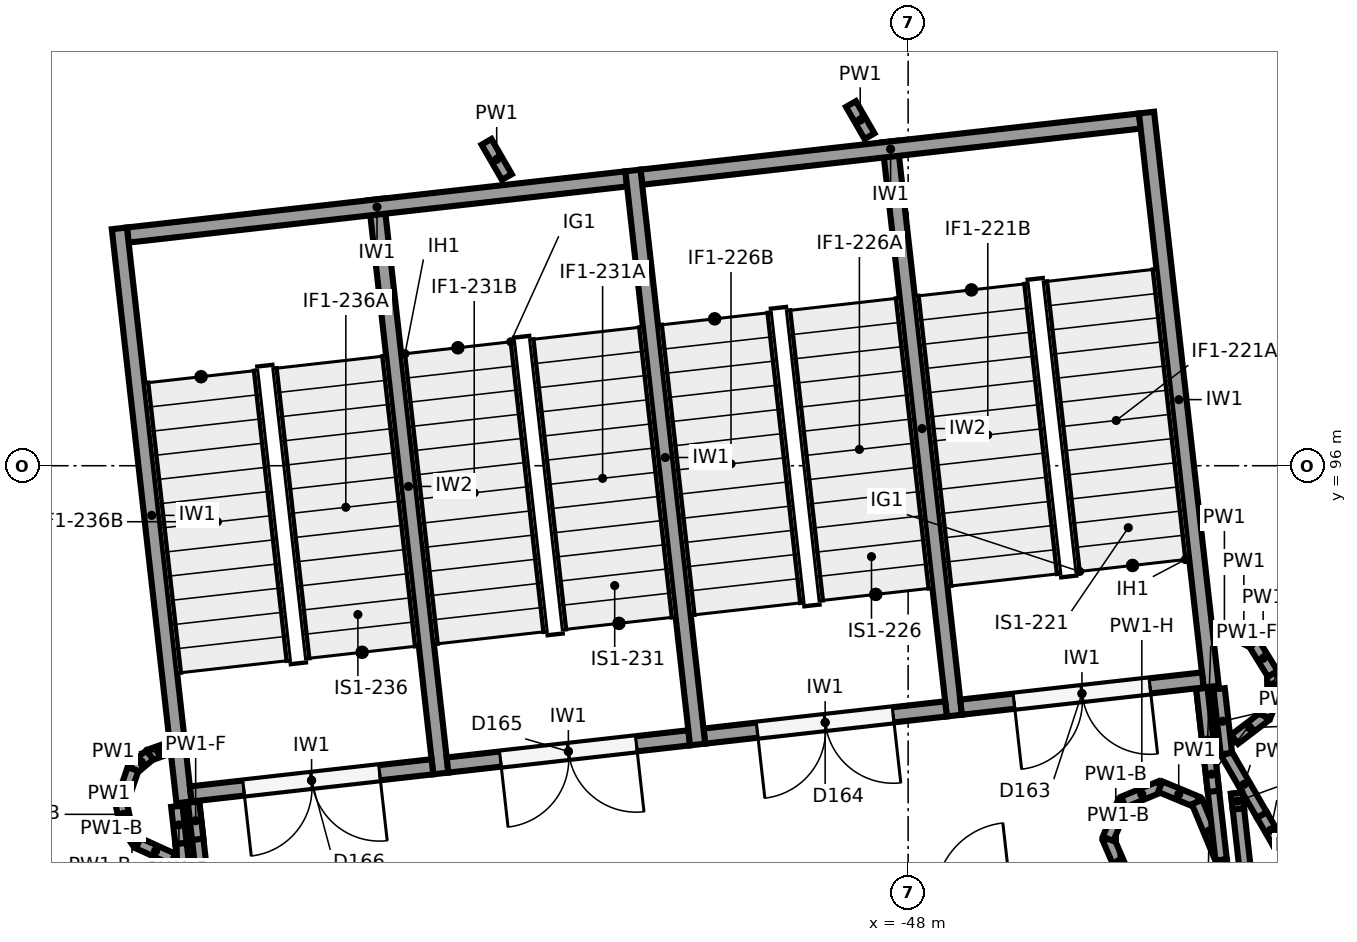
"""IFC4 building model, lengths in metres.
Left out: names, types, materials, properties, quantities, classifications, styles, units other than length and angle.
Written with IfcOpenShell. Run it as: python <this file> out.ifc"""

import sys

from ifc_helpers import new_model, si_unit, direction, frame, frame_2d, origin, origin_2d, place, context, subcontext, project, spatial, rectangle, circle, extrude, element, fill, save


model = new_model("IFC4")
c1 = context("Model", 3, precision=1e-05, world=origin(), true_north=direction((0.0, 1.0)))
c2 = subcontext(c1, "Body", "Model", "MODEL_VIEW")
j1 = project(units=[si_unit("LENGTHUNIT", "METRE"), si_unit("PLANEANGLEUNIT", "RADIAN")], contexts=[c1])
p1 = place(None, origin())
s1 = spatial("IfcSite", under=j1, at=p1, CompositionType="ELEMENT")
p2 = place(p1, origin())
s2 = spatial("IfcBuilding", under=s1, at=p2, CompositionType="ELEMENT")
p3 = place(p2, frame((0.0, 0.0, -4.0)))
s3 = spatial("IfcBuildingStorey", under=s2, at=p3, CompositionType="ELEMENT", Elevation=-4.0)
p4 = place(p3, frame((-44.683, 91.091, -1.2), z_axis=(0.0, 0.0, 1.0), x_axis=(1.0, 0.0, 0.0)))
e1 = element("IfcColumn", 1, at=p4, inside=s3, PredefinedType="COLUMN", context=c2, shape_type="SweptSolid", body=[
    extrude(circle(Radius=0.55, at=origin_2d()), origin(), (0.0, 0.0, 1.0), 5.2),
])
p5 = place(p3, frame((-44.863, 100.646, -1.2), z_axis=(0.0, 0.0, 1.0), x_axis=(0.111951003472, -0.993713727802, 0.0)))
e2 = element("IfcWall", 2, at=p5, inside=s3, PredefinedType="SHEAR", context=c2, shape_type="SweptSolid", body=[
    extrude(rectangle(XDim=7.6, YDim=0.2, at=frame_2d((3.8, 0.0))), origin(), (0.0, 0.0, 1.0), 4.8),
])
p6 = place(p3, frame((-51.621, 99.885, -1.2), z_axis=(0.0, 0.0, 1.0), x_axis=(0.111947429915, -0.993714130389, 0.0)))
e3 = element("IfcWall", 3, at=p6, inside=s3, PredefinedType="SHEAR", context=c2, shape_type="SweptSolid", body=[
    extrude(rectangle(XDim=7.6, YDim=0.2, at=frame_2d((3.8, 0.0))), origin(), (0.0, 0.0, 1.0), 4.8),
])
p7 = place(p3, frame((-58.378, 99.123, -1.2), z_axis=(0.0, 0.0, 1.0), x_axis=(0.111982724367, -0.993710153638, 0.0)))
e4 = element("IfcWall", 4, at=p7, inside=s3, PredefinedType="SHEAR", context=c2, shape_type="SweptSolid", body=[
    extrude(rectangle(XDim=7.6, YDim=0.2, at=frame_2d((3.8, 0.0))), origin(), (0.0, 0.0, 1.0), 4.8),
])
for number, where, z_axis, x_axis in (
    (5, (-44.951, 100.535, -1.2), (0.0, 0.0, 1.0), (-0.994, -0.112, 0.0)),
    (6, (-51.709, 99.774, -1.2), (0.0, 0.0, 1.0), (-0.994, -0.112, 0.0)),
):
    element("IfcWall", number, at=place(p3, frame(where, z_axis=z_axis, x_axis=x_axis)), inside=s3, PredefinedType="SHEAR", context=c2, shape_type="SweptSolid", body=[
        extrude(rectangle(XDim=6.6, YDim=0.2, at=frame_2d((3.3, 0.0))), origin(), (0.0, 0.0, 1.0), 4.8),
    ])
p8 = place(p3, frame((-48.242, 100.265, -1.2), z_axis=(0.0, 0.0, 1.0), x_axis=(0.111954577255, -0.993713325176, 0.0)))
e7 = element("IfcWall", 7, at=p8, inside=s3, PredefinedType="SHEAR", context=c2, shape_type="SweptSolid", body=[
    extrude(rectangle(XDim=7.6, YDim=0.2, at=frame_2d((3.8, 0.0))), origin(), (0.0, 0.0, 1.0), 4.8),
])
p9 = place(p3, frame((-54.999, 99.504, -1.2), z_axis=(0.0, 0.0, 1.0), x_axis=(0.111982724367, -0.993710153638, 0.0)))
e8 = element("IfcWall", 8, at=p9, inside=s3, PredefinedType="SHEAR", context=c2, shape_type="SweptSolid", body=[
    extrude(rectangle(XDim=7.6, YDim=0.2, at=frame_2d((3.8, 0.0))), origin(), (0.0, 0.0, 1.0), 4.8),
])
p10 = place(p3, frame((-44.123, 93.182, -1.2), z_axis=(0.0, 0.0, 1.0), x_axis=(-0.993717005286, -0.11192190762, 0.0)))
e9 = element("IfcWall", 9, at=p10, inside=s3, PredefinedType="SHEAR", context=c2, shape_type="SweptSolid", body=[
    extrude(rectangle(XDim=3.2, YDim=0.2, at=frame_2d((1.6, 0.0))), origin(), (0.0, 0.0, 1.0), 4.8),
])
p11 = place(p10, frame((0.7, 0.0, 1.2)))
e10 = element("IfcOpeningElement", 10, at=p11, cuts=e9, PredefinedType="OPENING", context=c2, shape_type="SweptSolid", body=[
    extrude(rectangle(XDim=1.8, YDim=2.1, at=frame_2d((0.9, 1.05))), frame((0.0, 0.11, 0.0), z_axis=(0.0, -1.0, 0.0), x_axis=(1.0, 0.0, 0.0)), (0.0, 0.0, 1.0), 0.22),
])
p12 = place(p3, frame((-47.502, 92.801, -1.2), z_axis=(0.0, 0.0, 1.0), x_axis=(-0.993707560215, -0.112005735442, 0.0)))
e11 = element("IfcWall", 11, at=p12, inside=s3, PredefinedType="SHEAR", context=c2, shape_type="SweptSolid", body=[
    extrude(rectangle(XDim=3.2, YDim=0.2, at=frame_2d((1.6, 0.0))), origin(), (0.0, 0.0, 1.0), 4.8),
])
p13 = place(p12, frame((0.7, 0.0, 1.2)))
e12 = element("IfcOpeningElement", 12, at=p13, cuts=e11, PredefinedType="OPENING", context=c2, shape_type="SweptSolid", body=[
    extrude(rectangle(XDim=1.8, YDim=2.1, at=frame_2d((0.9, 1.05))), frame((0.0, 0.11, 0.0), z_axis=(0.0, -1.0, 0.0), x_axis=(1.0, 0.0, 0.0)), (0.0, 0.0, 1.0), 0.22),
])
p14 = place(p3, frame((-50.88, 92.42, -1.2), z_axis=(0.0, 0.0, 1.0), x_axis=(-0.993707560215, -0.112005735442, 0.0)))
e13 = element("IfcWall", 13, at=p14, inside=s3, PredefinedType="SHEAR", context=c2, shape_type="SweptSolid", body=[
    extrude(rectangle(XDim=3.2, YDim=0.2, at=frame_2d((1.6, 0.0))), origin(), (0.0, 0.0, 1.0), 4.8),
])
p15 = place(p14, frame((0.7, 0.0, 1.2)))
e14 = element("IfcOpeningElement", 14, at=p15, cuts=e13, PredefinedType="OPENING", context=c2, shape_type="SweptSolid", body=[
    extrude(rectangle(XDim=1.8, YDim=2.1, at=frame_2d((0.9, 1.05))), frame((0.0, 0.11, 0.0), z_axis=(0.0, -1.0, 0.0), x_axis=(1.0, 0.0, 0.0)), (0.0, 0.0, 1.0), 0.22),
])
p16 = place(p3, frame((-54.259, 92.04, -1.2), z_axis=(0.0, 0.0, 1.0), x_axis=(-0.993717005286, -0.11192190762, 0.0)))
e15 = element("IfcWall", 15, at=p16, inside=s3, PredefinedType="SHEAR", context=c2, shape_type="SweptSolid", body=[
    extrude(rectangle(XDim=3.2, YDim=0.2, at=frame_2d((1.6, 0.0))), origin(), (0.0, 0.0, 1.0), 4.8),
])
p17 = place(p16, frame((0.7, 0.0, 1.2)))
e16 = element("IfcOpeningElement", 16, at=p17, cuts=e15, PredefinedType="OPENING", context=c2, shape_type="SweptSolid", body=[
    extrude(rectangle(XDim=1.8, YDim=2.1, at=frame_2d((0.9, 1.05))), frame((0.0, 0.11, 0.0), z_axis=(0.0, -1.0, 0.0), x_axis=(1.0, 0.0, 0.0)), (0.0, 0.0, 1.0), 0.22),
])
p18 = place(p3, frame((-48.508, 100.336, 0.0), z_axis=(0.0, 0.0, 1.0), x_axis=(-0.50016937228, 0.865927594567, 0.0)))
e17 = element("IfcWall", 17, at=p18, inside=s3, PredefinedType="PARTITIONING", context=c2, shape_type="SweptSolid", body=[
    extrude(rectangle(XDim=0.489, YDim=0.15, at=frame_2d((0.244, 0.0))), origin(), (0.0, 0.0, 1.0), 3.6),
])
for number, where, z_axis, x_axis in (
    (18, (-42.881, 90.6, 0.0), (0.0, 0.0, 1.0), (-0.5, 0.866, 0.0)),
    (19, (-43.114, 91.003, 0.0), (0.0, 0.0, 1.0), (-0.5, 0.866, 0.0)),
):
    element("IfcWall", number, at=place(p3, frame(where, z_axis=z_axis, x_axis=x_axis)), inside=s3, PredefinedType="PARTITIONING", context=c2, shape_type="SweptSolid", body=[
        extrude(rectangle(XDim=0.466, YDim=0.15, at=frame_2d((0.233, 0.0))), origin(), (0.0, 0.0, 1.0), 2.5),
    ])
p19 = place(p3, frame((-43.346, 91.406, 0.0), z_axis=(0.0, 0.0, 1.0), x_axis=(-0.500395505551, 0.865796938101, 0.0)))
e20 = element("IfcWall", 20, at=p19, inside=s3, PredefinedType="PARTITIONING", context=c2, shape_type="SweptSolid", body=[
    extrude(rectangle(XDim=0.931, YDim=0.15, at=frame_2d((0.466, 0.0))), origin(), (0.0, 0.0, 1.0), 3.6),
])
p20 = place(p3, frame((-43.812, 92.212, 0.0), z_axis=(0.0, 0.0, 1.0), x_axis=(-0.112117924941, 0.993694908363, 0.0)))
e21 = element("IfcWall", 21, at=p20, inside=s3, PredefinedType="PARTITIONING", context=c2, shape_type="SweptSolid", body=[
    extrude(rectangle(XDim=0.858, YDim=0.15, at=frame_2d((0.429, 0.0))), origin(), (0.0, 0.0, 1.0), 3.6),
])
p21 = place(p3, frame((-57.622, 91.52, 0.0), z_axis=(0.0, 0.0, 1.0), x_axis=(0.112221929923, -0.993683168039, 0.0)))
e22 = element("IfcWall", 22, at=p21, inside=s3, PredefinedType="PARTITIONING", context=c2, shape_type="SweptSolid", body=[
    extrude(rectangle(XDim=0.494, YDim=0.15, at=frame_2d((0.247, 0.0))), origin(), (0.0, 0.0, 1.0), 2.5),
])
p22 = place(p3, frame((-57.566, 91.029, 0.0), z_axis=(0.0, 0.0, 1.0), x_axis=(0.111733745595, -0.993738179852, 0.0)))
e23 = element("IfcWall", 23, at=p22, inside=s3, PredefinedType="PARTITIONING", context=c2, shape_type="SweptSolid", body=[
    extrude(rectangle(XDim=0.988, YDim=0.15, at=frame_2d((0.494, 0.0))), origin(), (0.0, 0.0, 1.0), 2.5),
])
p23 = place(p3, frame((-53.547, 100.261, 0.0), z_axis=(0.0, 0.0, 1.0), x_axis=(0.500460168826, -0.86575956213, 0.0)))
e24 = element("IfcWall", 24, at=p23, inside=s3, PredefinedType="PARTITIONING", context=c2, shape_type="SweptSolid", body=[
    extrude(rectangle(XDim=0.535, YDim=0.15, at=frame_2d((0.267, 0.0))), origin(), (0.0, 0.0, 1.0), 3.6),
])
p24 = place(p3, frame((-57.402, 91.575, 0.0), z_axis=(0.0, 0.0, 1.0), x_axis=(0.112018501257, -0.993706121233, 0.0)))
e25 = element("IfcWall", 25, at=p24, inside=s3, PredefinedType="PARTITIONING", context=c2, shape_type="SweptSolid", body=[
    extrude(rectangle(XDim=2.465, YDim=0.15, at=frame_2d((1.232, 0.0))), origin(), (0.0, 0.0, 1.0), 2.5),
])
p25 = place(p3, frame((-57.402, 91.575, 2.5), z_axis=(0.0, 0.0, 1.0), x_axis=(0.111953754949, -0.993713417819, 0.0)))
e26 = element("IfcWall", 26, at=p25, inside=s3, PredefinedType="PARTITIONING", context=c2, shape_type="SweptSolid", body=[
    extrude(rectangle(XDim=0.493, YDim=0.15, at=frame_2d((0.247, 0.0))), origin(), (0.0, 0.0, 1.0), 1.1),
])
p26 = place(p3, frame((-45.104, 90.48, 0.0), z_axis=(0.0, 0.0, 1.0), x_axis=(-0.396702631354, 0.917947178369, 0.0)))
e27 = element("IfcWall", 27, at=p26, inside=s3, PredefinedType="PARTITIONING", context=c2, shape_type="SweptSolid", body=[
    extrude(rectangle(XDim=0.667, YDim=0.15, at=frame_2d((0.333, 0.0))), origin(), (0.0, 0.0, 1.0), 2.5),
])
p27 = place(p3, frame((-45.369, 91.092, 0.0), z_axis=(0.0, 0.0, 1.0), x_axis=(0.382831074092, 0.923818363484, 0.0)))
e28 = element("IfcWall", 28, at=p27, inside=s3, PredefinedType="PARTITIONING", context=c2, shape_type="SweptSolid", body=[
    extrude(rectangle(XDim=0.525, YDim=0.15, at=frame_2d((0.262, 0.0))), origin(), (0.0, 0.0, 1.0), 2.5),
])
p28 = place(p3, frame((-45.168, 91.576, 0.0), z_axis=(0.0, 0.0, 1.0), x_axis=(0.923954536818, 0.382502305735, 0.0)))
e29 = element("IfcWall", 29, at=p28, inside=s3, PredefinedType="PARTITIONING", context=c2, shape_type="SweptSolid", body=[
    extrude(rectangle(XDim=0.525, YDim=0.15, at=frame_2d((0.263, 0.0))), origin(), (0.0, 0.0, 1.0), 3.0),
])
p29 = place(p3, frame((-44.682, 91.777, 0.0), z_axis=(0.0, 0.0, 1.0), x_axis=(0.923886494024, -0.382666625355, 0.0)))
e30 = element("IfcWall", 30, at=p29, inside=s3, PredefinedType="PARTITIONING", context=c2, shape_type="SweptSolid", body=[
    extrude(rectangle(XDim=0.525, YDim=0.15, at=frame_2d((0.263, 0.0))), origin(), (0.0, 0.0, 1.0), 3.6),
])
p30 = place(p3, frame((-44.197, 91.576, 0.0), z_axis=(0.0, 0.0, 1.0), x_axis=(0.382848633097, -0.923811086822, 0.0)))
e31 = element("IfcWall", 31, at=p30, inside=s3, PredefinedType="PARTITIONING", context=c2, shape_type="SweptSolid", body=[
    extrude(rectangle(XDim=0.824, YDim=0.15, at=frame_2d((0.412, 0.0))), origin(), (0.0, 0.0, 1.0), 2.5),
])
p31 = place(p3, frame((-43.882, 90.815, 0.0), z_axis=(0.0, 0.0, 1.0), x_axis=(-0.111895707458, 0.993719955849, 0.0)))
e32 = element("IfcWall", 32, at=p31, inside=s3, PredefinedType="PARTITIONING", context=c2, shape_type="SweptSolid", body=[
    extrude(rectangle(XDim=2.269, YDim=0.15, at=frame_2d((1.135, 0.0))), origin(), (0.0, 0.0, 1.0), 2.5),
])
p32 = place(p3, frame((-43.983, 91.717, 2.5), z_axis=(0.0, 0.0, 1.0), x_axis=(-0.111907672209, 0.993718608511, 0.0)))
e33 = element("IfcWall", 33, at=p32, inside=s3, PredefinedType="PARTITIONING", context=c2, shape_type="SweptSolid", body=[
    extrude(rectangle(XDim=1.361, YDim=0.15, at=frame_2d((0.681, 0.0))), origin(), (0.0, 0.0, 1.0), 1.1),
])
p33 = place(p3, frame((-57.736, 92.281, 0.0), z_axis=(0.0, 0.0, 1.0), x_axis=(-0.941549075512, -0.336875850133, 0.0)))
e34 = element("IfcWall", 34, at=p33, inside=s3, PredefinedType="PARTITIONING", context=c2, shape_type="SweptSolid", body=[
    extrude(rectangle(XDim=0.258, YDim=0.15, at=frame_2d((0.129, 0.0))), origin(), (0.0, 0.0, 1.0), 3.6),
])
p34 = place(p3, frame((-57.979, 92.195, 0.0), z_axis=(0.0, 0.0, 1.0), x_axis=(-0.763611518969, -0.64567596215, 0.0)))
e35 = element("IfcWall", 35, at=p34, inside=s3, PredefinedType="PARTITIONING", context=c2, shape_type="SweptSolid", body=[
    extrude(rectangle(XDim=0.288, YDim=0.15, at=frame_2d((0.144, 0.0))), origin(), (0.0, 0.0, 1.0), 3.6),
])
p35 = place(p3, frame((-58.199, 92.009, 0.0), z_axis=(0.0, 0.0, 1.0), x_axis=(-0.323699669456, -0.946159882892, 0.0)))
e36 = element("IfcWall", 36, at=p35, inside=s3, PredefinedType="PARTITIONING", context=c2, shape_type="SweptSolid", body=[
    extrude(rectangle(XDim=0.48, YDim=0.15, at=frame_2d((0.24, 0.0))), origin(), (0.0, 0.0, 1.0), 2.5),
])
p36 = place(p3, frame((-58.354, 91.555, 0.0), z_axis=(0.0, 0.0, 1.0), x_axis=(0.209413753184, -0.977827121723, 0.0)))
e37 = element("IfcWall", 37, at=p36, inside=s3, PredefinedType="PARTITIONING", context=c2, shape_type="SweptSolid", body=[
    extrude(rectangle(XDim=0.289, YDim=0.15, at=frame_2d((0.145, 0.0))), origin(), (0.0, 0.0, 1.0), 2.5),
])
p37 = place(p3, frame((-58.293, 91.272, 0.0), z_axis=(0.0, 0.0, 1.0), x_axis=(0.566707762339, -0.823918874711, 0.0)))
e38 = element("IfcWall", 38, at=p37, inside=s3, PredefinedType="PARTITIONING", context=c2, shape_type="SweptSolid", body=[
    extrude(rectangle(XDim=0.29, YDim=0.15, at=frame_2d((0.145, 0.0))), origin(), (0.0, 0.0, 1.0), 2.5),
])
p38 = place(p3, frame((-58.129, 91.034, 0.0), z_axis=(0.0, 0.0, 1.0), x_axis=(0.910666917377, -0.413141338521, 0.0)))
e39 = element("IfcWall", 39, at=p38, inside=s3, PredefinedType="PARTITIONING", context=c2, shape_type="SweptSolid", body=[
    extrude(rectangle(XDim=0.5, YDim=0.15, at=frame_2d((0.25, 0.0))), origin(), (0.0, 0.0, 1.0), 2.5),
])
p39 = place(p3, frame((-42.865, 84.478, 0.0), z_axis=(0.0, 0.0, 1.0), x_axis=(-0.111977823114, 0.993710705956, 0.0)))
e40 = element("IfcWall", 40, at=p39, inside=s3, PredefinedType="PARTITIONING", context=c2, shape_type="SweptSolid", body=[
    extrude(rectangle(XDim=7.26, YDim=0.15, at=frame_2d((3.63, 0.0))), origin(), (0.0, 0.0, 1.0), 2.5),
])
p40 = place(p3, frame((-43.655, 91.483, 2.5), z_axis=(0.0, 0.0, 1.0), x_axis=(-0.112597137897, 0.993640722061, 0.0)))
e41 = element("IfcWall", 41, at=p40, inside=s3, PredefinedType="PARTITIONING", context=c2, shape_type="SweptSolid", body=[
    extrude(rectangle(XDim=0.21, YDim=0.15, at=frame_2d((0.105, 0.0))), origin(), (0.0, 0.0, 1.0), 1.1),
])
p41 = place(p3, frame((-43.704, 92.401, 0.0), z_axis=(0.0, 0.0, 1.0), x_axis=(0.795767393102, 0.605602391074, 0.0)))
e42 = element("IfcWall", 42, at=p41, inside=s3, PredefinedType="PARTITIONING", context=c2, shape_type="SweptSolid", body=[
    extrude(rectangle(XDim=0.501, YDim=0.15, at=frame_2d((0.25, 0.0))), origin(), (0.0, 0.0, 1.0), 3.6),
])
for number, where, z_axis, x_axis in (
    (43, (-43.305, 92.704, 0.0), (0.0, 0.0, 1.0), (0.37, 0.929, 0.0)),
    (44, (-43.198, 92.973, 0.0), (0.0, 0.0, 1.0), (-0.014, 1.0, 0.0)),
):
    element("IfcWall", number, at=place(p3, frame(where, z_axis=z_axis, x_axis=x_axis)), inside=s3, PredefinedType="PARTITIONING", context=c2, shape_type="SweptSolid", body=[
        extrude(rectangle(XDim=0.289, YDim=0.15, at=frame_2d((0.145, 0.0))), origin(), (0.0, 0.0, 1.0), 3.6),
    ])
p42 = place(p3, frame((-43.203, 93.262, 0.0), z_axis=(0.0, 0.0, 1.0), x_axis=(-0.526056545072, 0.850449593678, 0.0)))
e45 = element("IfcWall", 45, at=p42, inside=s3, PredefinedType="PARTITIONING", context=c2, shape_type="SweptSolid", body=[
    extrude(rectangle(XDim=0.479, YDim=0.15, at=frame_2d((0.24, 0.0))), origin(), (0.0, 0.0, 1.0), 3.6),
])
p43 = place(p3, frame((-43.455, 93.67, 0.0), z_axis=(0.0, 0.0, 1.0), x_axis=(-0.888587212909, 0.458707712007, 0.0)))
e46 = element("IfcWall", 46, at=p43, inside=s3, PredefinedType="PARTITIONING", context=c2, shape_type="SweptSolid", body=[
    extrude(rectangle(XDim=0.288, YDim=0.15, at=frame_2d((0.144, 0.0))), origin(), (0.0, 0.0, 1.0), 3.6),
])
p44 = place(p3, frame((-43.711, 93.802, 0.0), z_axis=(0.0, 0.0, 1.0), x_axis=(-0.992737210656, 0.120303078009, 0.0)))
e47 = element("IfcWall", 47, at=p44, inside=s3, PredefinedType="PARTITIONING", context=c2, shape_type="SweptSolid", body=[
    extrude(rectangle(XDim=0.258, YDim=0.15, at=frame_2d((0.129, 0.0))), origin(), (0.0, 0.0, 1.0), 3.6),
])
p45 = place(p11, origin())
e48 = element("IfcDoor", 48, at=p45, inside=s3, OperationType="DOUBLE_DOOR_SINGLE_SWING", PredefinedType="DOOR", context=c2, shape_type="SweptSolid", body=[
    extrude(rectangle(XDim=1.8, YDim=2.1, at=frame_2d((0.9, 1.05))), frame((0.0, 0.025, 0.0), z_axis=(0.0, -1.0, 0.0), x_axis=(1.0, 0.0, 0.0)), (0.0, 0.0, 1.0), 0.05),
])
fill(e10, e48)
p46 = place(p13, origin())
e49 = element("IfcDoor", 49, at=p46, inside=s3, OperationType="DOUBLE_DOOR_SINGLE_SWING", PredefinedType="DOOR", context=c2, shape_type="SweptSolid", body=[
    extrude(rectangle(XDim=1.8, YDim=2.1, at=frame_2d((0.9, 1.05))), frame((0.0, 0.025, 0.0), z_axis=(0.0, -1.0, 0.0), x_axis=(1.0, 0.0, 0.0)), (0.0, 0.0, 1.0), 0.05),
])
fill(e12, e49)
p47 = place(p15, origin())
e50 = element("IfcDoor", 50, at=p47, inside=s3, OperationType="DOUBLE_DOOR_SINGLE_SWING", PredefinedType="DOOR", context=c2, shape_type="SweptSolid", body=[
    extrude(rectangle(XDim=1.8, YDim=2.1, at=frame_2d((0.9, 1.05))), frame((0.0, 0.025, 0.0), z_axis=(0.0, -1.0, 0.0), x_axis=(1.0, 0.0, 0.0)), (0.0, 0.0, 1.0), 0.05),
])
fill(e14, e50)
p48 = place(p17, origin())
e51 = element("IfcDoor", 51, at=p48, inside=s3, OperationType="DOUBLE_DOOR_SINGLE_SWING", PredefinedType="DOOR", context=c2, shape_type="SweptSolid", body=[
    extrude(rectangle(XDim=1.8, YDim=2.1, at=frame_2d((0.9, 1.05))), frame((0.0, 0.025, 0.0), z_axis=(0.0, -1.0, 0.0), x_axis=(1.0, 0.0, 0.0)), (0.0, 0.0, 1.0), 0.05),
])
fill(e16, e51)
save(model, sys.argv[1])
